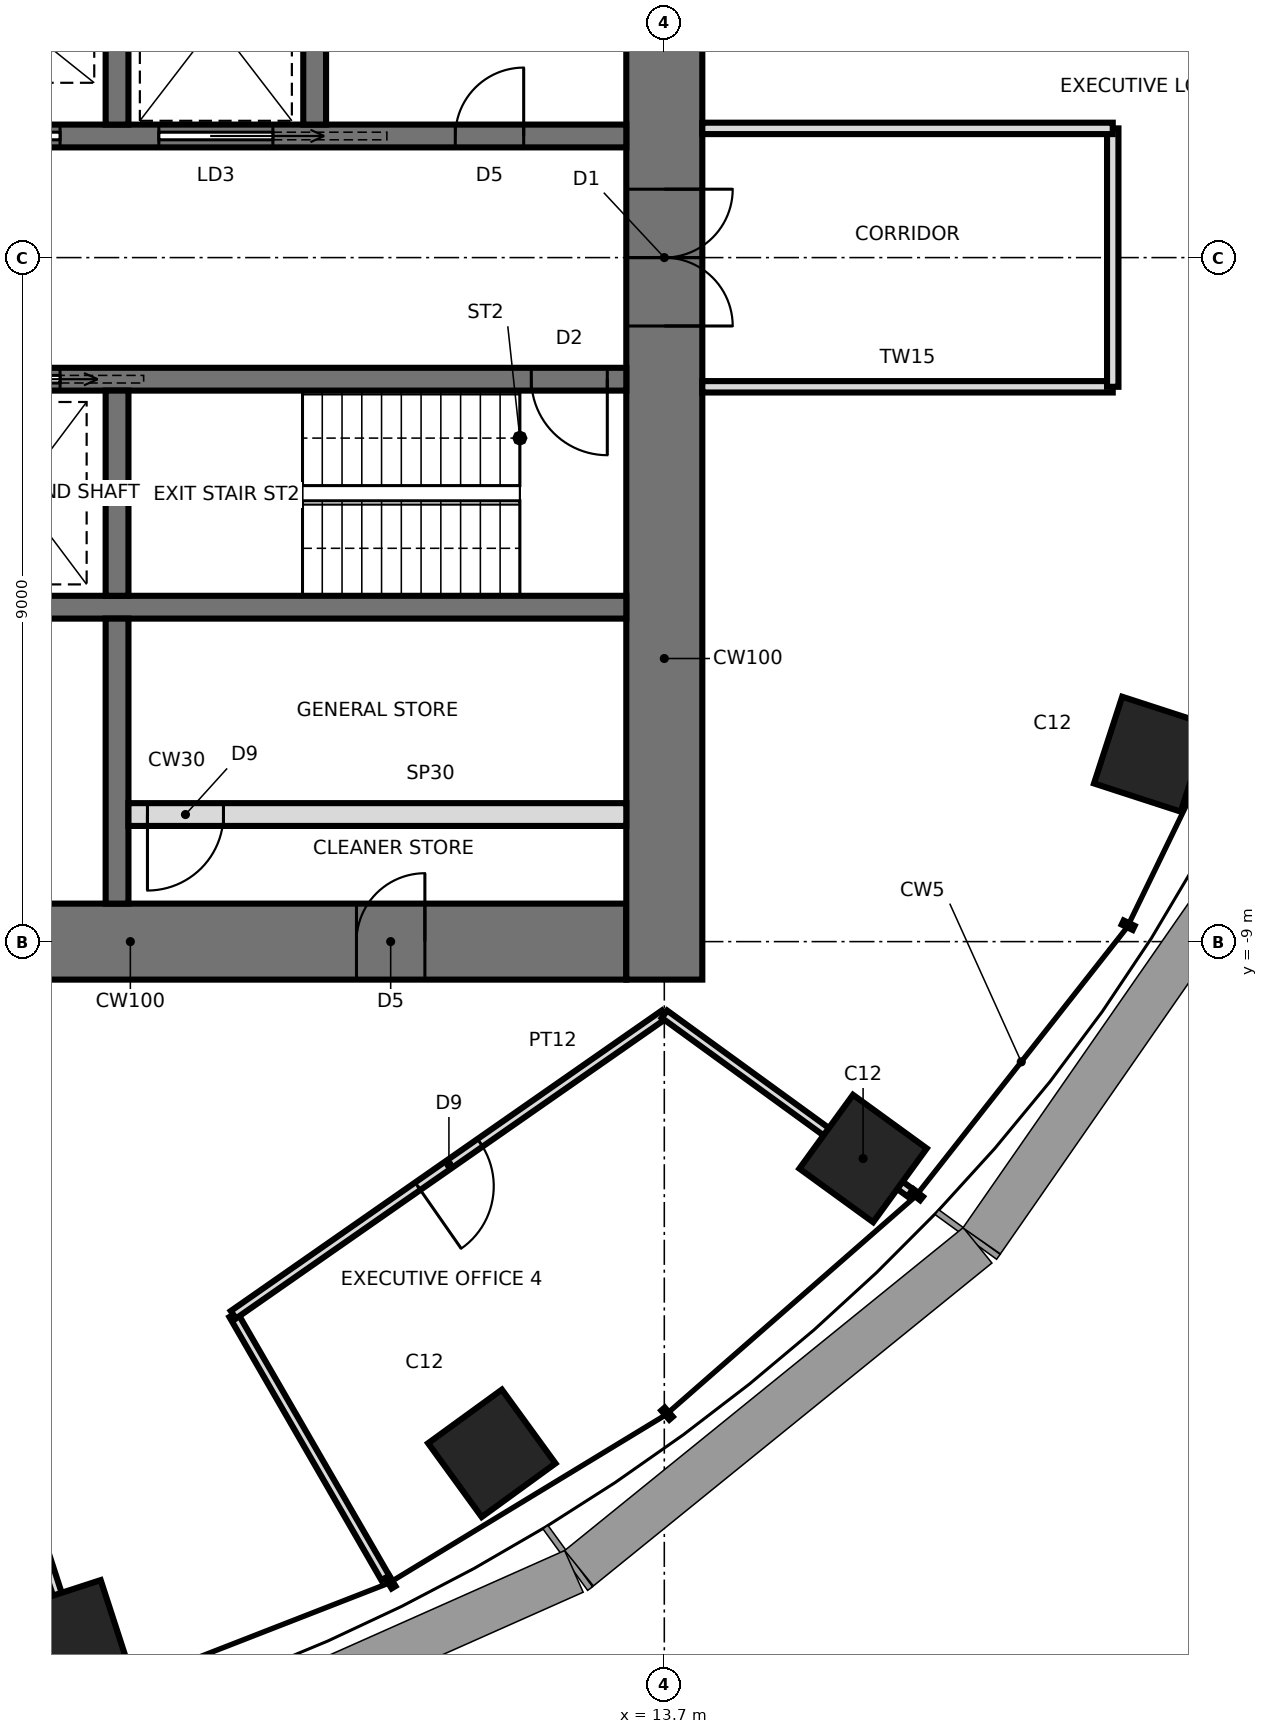
"""IFC4 building model, lengths in metres.
Left out: names, types, materials, properties, quantities, classifications, styles, units other than length and angle.
Written with IfcOpenShell. Run it as: python <this file> out.ifc"""

import sys

from ifc_helpers import new_model, si_unit, direction, frame, frame_2d, origin, origin_2d, place, context, subcontext, project, spatial, rectangle, extrude, element, fill, save


model = new_model("IFC4")
c1 = context("Model", 3, precision=1e-05, world=origin(), true_north=direction((0.0, 1.0)))
c2 = subcontext(c1, "Body", "Model", "MODEL_VIEW")
j1 = project(units=[si_unit("LENGTHUNIT", "METRE"), si_unit("PLANEANGLEUNIT", "RADIAN")], contexts=[c1])
p1 = place(None, origin())
s1 = spatial("IfcSite", under=j1, at=p1, CompositionType="ELEMENT")
p2 = place(p1, origin())
s2 = spatial("IfcBuilding", under=s1, at=p2, CompositionType="ELEMENT")
p3 = place(p2, frame((0.0, 0.0, 256.0)))
s3 = spatial("IfcBuildingStorey", under=s2, at=p3, CompositionType="ELEMENT", Elevation=256.0)
for number, where, z_axis, x_axis in (
    (1, (5.9, -18.157, 0.0), (0.0, 0.0, 1.0), (0.309, -0.951, 0.0)),
    (2, (11.43, -15.733, 0.0), (0.0, 0.0, 1.0), (0.588, -0.809, 0.0)),
    (3, (16.315, -11.854, 0.0), (0.0, 0.0, 1.0), (0.809, -0.588, 0.0)),
    (4, (20.109, -6.534, 0.0), (0.0, 0.0, 1.0), (0.951, -0.309, 0.0)),
):
    element("IfcColumn", number, at=place(p3, frame(where, z_axis=z_axis, x_axis=x_axis)), inside=s3, PredefinedType="COLUMN", context=c2, shape_type="SweptSolid", body=[
        extrude(rectangle(XDim=1.2, YDim=1.2, at=origin_2d()), origin(), (0.0, 0.0, 1.0), 4.2),
    ])
p4 = place(p3, frame((-13.2, -9.0, 0.0), z_axis=(0.0, 0.0, 1.0), x_axis=(1.0, 0.0, 0.0)))
e5 = element("IfcWall", 5, at=p4, inside=s3, PredefinedType="SHEAR", context=c2, shape_type="SweptSolid", body=[
    extrude(rectangle(XDim=26.4, YDim=1.0, at=frame_2d((13.2, 0.0))), origin(), (0.0, 0.0, 1.0), 4.2),
])
p5 = place(p4, frame((2.65, 0.0, 0.0)))
e6 = element("IfcOpeningElement", 6, at=p5, cuts=e5, PredefinedType="OPENING", context=c2, shape_type="SweptSolid", body=[
    extrude(rectangle(XDim=0.9, YDim=2.1, at=frame_2d((0.45, 1.05))), frame((0.0, 0.51, 0.0), z_axis=(0.0, -1.0, 0.0), x_axis=(1.0, 0.0, 0.0)), (0.0, 0.0, 1.0), 1.02),
])
p6 = place(p4, frame((9.5, 0.0, 0.0)))
e7 = element("IfcOpeningElement", 7, at=p6, cuts=e5, PredefinedType="OPENING", context=c2, shape_type="SweptSolid", body=[
    extrude(rectangle(XDim=0.9, YDim=2.1, at=frame_2d((0.45, 1.05))), frame((0.0, 0.51, 0.0), z_axis=(0.0, -1.0, 0.0), x_axis=(1.0, 0.0, 0.0)), (0.0, 0.0, 1.0), 1.02),
])
p7 = place(p4, frame((16.0, 0.0, 0.0)))
e8 = element("IfcOpeningElement", 8, at=p7, cuts=e5, PredefinedType="OPENING", context=c2, shape_type="SweptSolid", body=[
    extrude(rectangle(XDim=0.9, YDim=2.1, at=frame_2d((0.45, 1.05))), frame((0.0, 0.51, 0.0), z_axis=(0.0, -1.0, 0.0), x_axis=(1.0, 0.0, 0.0)), (0.0, 0.0, 1.0), 1.02),
])
p8 = place(p4, frame((22.85, 0.0, 0.0)))
e9 = element("IfcOpeningElement", 9, at=p8, cuts=e5, PredefinedType="OPENING", context=c2, shape_type="SweptSolid", body=[
    extrude(rectangle(XDim=0.9, YDim=2.1, at=frame_2d((0.45, 1.05))), frame((0.0, 0.51, 0.0), z_axis=(0.0, -1.0, 0.0), x_axis=(1.0, 0.0, 0.0)), (0.0, 0.0, 1.0), 1.02),
])
p9 = place(p3, frame((13.7, -9.5, 0.0), z_axis=(0.0, 0.0, 1.0), x_axis=(0.0, 1.0, 0.0)))
e10 = element("IfcWall", 10, at=p9, inside=s3, PredefinedType="SHEAR", context=c2, shape_type="SweptSolid", body=[
    extrude(rectangle(XDim=19.0, YDim=1.0, at=frame_2d((9.5, 0.0))), origin(), (0.0, 0.0, 1.0), 4.2),
])
p10 = place(p9, frame((8.6, 0.0, 0.0)))
e11 = element("IfcOpeningElement", 11, at=p10, cuts=e10, PredefinedType="OPENING", context=c2, shape_type="SweptSolid", body=[
    extrude(rectangle(XDim=1.8, YDim=2.4, at=frame_2d((0.9, 1.2))), frame((0.0, 0.51, 0.0), z_axis=(0.0, -1.0, 0.0), x_axis=(1.0, 0.0, 0.0)), (0.0, 0.0, 1.0), 1.02),
])
p11 = place(p3, frame((-13.2, 1.6, 0.0), z_axis=(0.0, 0.0, 1.0), x_axis=(1.0, 0.0, 0.0)))
e12 = element("IfcWall", 12, at=p11, inside=s3, PredefinedType="SHEAR", context=c2, shape_type="SweptSolid", body=[
    extrude(rectangle(XDim=26.4, YDim=0.3, at=frame_2d((13.2, 0.0))), origin(), (0.0, 0.0, 1.0), 4.2),
])
p12 = place(p11, frame((0.25, 0.0, 0.0)))
e13 = element("IfcOpeningElement", 13, at=p12, cuts=e12, PredefinedType="OPENING", context=c2, shape_type="SweptSolid", body=[
    extrude(rectangle(XDim=1.0, YDim=2.1, at=frame_2d((0.5, 1.05))), frame((0.0, 0.16, 0.0), z_axis=(0.0, -1.0, 0.0), x_axis=(1.0, 0.0, 0.0)), (0.0, 0.0, 1.0), 0.32),
])
p13 = place(p11, frame((20.25, 0.0, 0.0)))
e14 = element("IfcOpeningElement", 14, at=p13, cuts=e12, PredefinedType="OPENING", context=c2, shape_type="SweptSolid", body=[
    extrude(rectangle(XDim=1.5, YDim=2.4, at=frame_2d((0.75, 1.2))), frame((0.0, 0.16, 0.0), z_axis=(0.0, -1.0, 0.0), x_axis=(1.0, 0.0, 0.0)), (0.0, 0.0, 1.0), 0.32),
])
p14 = place(p11, frame((7.55, 0.0, 0.0)))
e15 = element("IfcOpeningElement", 15, at=p14, cuts=e12, PredefinedType="OPENING", context=c2, shape_type="SweptSolid", body=[
    extrude(rectangle(XDim=0.9, YDim=2.1, at=frame_2d((0.45, 1.05))), frame((0.0, 0.16, 0.0), z_axis=(0.0, -1.0, 0.0), x_axis=(1.0, 0.0, 0.0)), (0.0, 0.0, 1.0), 0.32),
])
p15 = place(p11, frame((10.15, 0.0, 0.0)))
e16 = element("IfcOpeningElement", 16, at=p15, cuts=e12, PredefinedType="OPENING", context=c2, shape_type="SweptSolid", body=[
    extrude(rectangle(XDim=0.9, YDim=2.1, at=frame_2d((0.45, 1.05))), frame((0.0, 0.16, 0.0), z_axis=(0.0, -1.0, 0.0), x_axis=(1.0, 0.0, 0.0)), (0.0, 0.0, 1.0), 0.32),
])
p16 = place(p11, frame((12.75, 0.0, 0.0)))
e17 = element("IfcOpeningElement", 17, at=p16, cuts=e12, PredefinedType="OPENING", context=c2, shape_type="SweptSolid", body=[
    extrude(rectangle(XDim=0.9, YDim=2.1, at=frame_2d((0.45, 1.05))), frame((0.0, 0.16, 0.0), z_axis=(0.0, -1.0, 0.0), x_axis=(1.0, 0.0, 0.0)), (0.0, 0.0, 1.0), 0.32),
])
p17 = place(p11, frame((15.25, 0.0, 0.0)))
e18 = element("IfcOpeningElement", 18, at=p17, cuts=e12, PredefinedType="OPENING", context=c2, shape_type="SweptSolid", body=[
    extrude(rectangle(XDim=1.1, YDim=2.3, at=frame_2d((0.55, 1.15))), frame((0.0, 0.16, 0.0), z_axis=(0.0, -1.0, 0.0), x_axis=(1.0, 0.0, 0.0)), (0.0, 0.0, 1.0), 0.32),
])
p18 = place(p11, frame((17.85, 0.0, 0.0)))
e19 = element("IfcOpeningElement", 19, at=p18, cuts=e12, PredefinedType="OPENING", context=c2, shape_type="SweptSolid", body=[
    extrude(rectangle(XDim=1.1, YDim=2.3, at=frame_2d((0.55, 1.15))), frame((0.0, 0.16, 0.0), z_axis=(0.0, -1.0, 0.0), x_axis=(1.0, 0.0, 0.0)), (0.0, 0.0, 1.0), 0.32),
])
p19 = place(p11, frame((24.15, 0.0, 0.0)))
e20 = element("IfcOpeningElement", 20, at=p19, cuts=e12, PredefinedType="OPENING", context=c2, shape_type="SweptSolid", body=[
    extrude(rectangle(XDim=0.9, YDim=2.1, at=frame_2d((0.45, 1.05))), frame((0.0, 0.16, 0.0), z_axis=(0.0, -1.0, 0.0), x_axis=(1.0, 0.0, 0.0)), (0.0, 0.0, 1.0), 0.32),
])
p20 = place(p3, frame((-13.2, -1.6, 0.0), z_axis=(0.0, 0.0, 1.0), x_axis=(1.0, 0.0, 0.0)))
e21 = element("IfcWall", 21, at=p20, inside=s3, PredefinedType="SHEAR", context=c2, shape_type="SweptSolid", body=[
    extrude(rectangle(XDim=26.4, YDim=0.3, at=frame_2d((13.2, 0.0))), origin(), (0.0, 0.0, 1.0), 4.2),
])
p21 = place(p20, frame((25.15, 0.0, 0.0)))
e22 = element("IfcOpeningElement", 22, at=p21, cuts=e21, PredefinedType="OPENING", context=c2, shape_type="SweptSolid", body=[
    extrude(rectangle(XDim=1.0, YDim=2.1, at=frame_2d((0.5, 1.05))), frame((0.0, 0.16, 0.0), z_axis=(0.0, -1.0, 0.0), x_axis=(1.0, 0.0, 0.0)), (0.0, 0.0, 1.0), 0.32),
])
p22 = place(p20, frame((7.55, 0.0, 0.0)))
e23 = element("IfcOpeningElement", 23, at=p22, cuts=e21, PredefinedType="OPENING", context=c2, shape_type="SweptSolid", body=[
    extrude(rectangle(XDim=0.9, YDim=2.1, at=frame_2d((0.45, 1.05))), frame((0.0, 0.16, 0.0), z_axis=(0.0, -1.0, 0.0), x_axis=(1.0, 0.0, 0.0)), (0.0, 0.0, 1.0), 0.32),
])
p23 = place(p20, frame((10.15, 0.0, 0.0)))
e24 = element("IfcOpeningElement", 24, at=p23, cuts=e21, PredefinedType="OPENING", context=c2, shape_type="SweptSolid", body=[
    extrude(rectangle(XDim=0.9, YDim=2.1, at=frame_2d((0.45, 1.05))), frame((0.0, 0.16, 0.0), z_axis=(0.0, -1.0, 0.0), x_axis=(1.0, 0.0, 0.0)), (0.0, 0.0, 1.0), 0.32),
])
p24 = place(p20, frame((12.75, 0.0, 0.0)))
e25 = element("IfcOpeningElement", 25, at=p24, cuts=e21, PredefinedType="OPENING", context=c2, shape_type="SweptSolid", body=[
    extrude(rectangle(XDim=0.9, YDim=2.1, at=frame_2d((0.45, 1.05))), frame((0.0, 0.16, 0.0), z_axis=(0.0, -1.0, 0.0), x_axis=(1.0, 0.0, 0.0)), (0.0, 0.0, 1.0), 0.32),
])
p25 = place(p20, frame((15.25, 0.0, 0.0)))
e26 = element("IfcOpeningElement", 26, at=p25, cuts=e21, PredefinedType="OPENING", context=c2, shape_type="SweptSolid", body=[
    extrude(rectangle(XDim=1.1, YDim=2.3, at=frame_2d((0.55, 1.15))), frame((0.0, 0.16, 0.0), z_axis=(0.0, -1.0, 0.0), x_axis=(1.0, 0.0, 0.0)), (0.0, 0.0, 1.0), 0.32),
])
p26 = place(p20, frame((17.85, 0.0, 0.0)))
e27 = element("IfcOpeningElement", 27, at=p26, cuts=e21, PredefinedType="OPENING", context=c2, shape_type="SweptSolid", body=[
    extrude(rectangle(XDim=1.1, YDim=2.3, at=frame_2d((0.55, 1.15))), frame((0.0, 0.16, 0.0), z_axis=(0.0, -1.0, 0.0), x_axis=(1.0, 0.0, 0.0)), (0.0, 0.0, 1.0), 0.32),
])
p27 = place(p20, frame((5.55, 0.0, 0.0)))
e28 = element("IfcOpeningElement", 28, at=p27, cuts=e21, PredefinedType="OPENING", context=c2, shape_type="SweptSolid", body=[
    extrude(rectangle(XDim=0.9, YDim=2.1, at=frame_2d((0.45, 1.05))), frame((0.0, 0.16, 0.0), z_axis=(0.0, -1.0, 0.0), x_axis=(1.0, 0.0, 0.0)), (0.0, 0.0, 1.0), 0.32),
])
p28 = place(p3, frame((-13.2, -4.6, 0.0), z_axis=(0.0, 0.0, 1.0), x_axis=(1.0, 0.0, 0.0)))
e29 = element("IfcWall", 29, at=p28, inside=s3, PredefinedType="SHEAR", context=c2, shape_type="SweptSolid", body=[
    extrude(rectangle(XDim=26.4, YDim=0.3, at=frame_2d((13.2, 0.0))), origin(), (0.0, 0.0, 1.0), 4.2),
])
for number, where, z_axis, x_axis in (
    (30, (6.5, 1.75, 0.0), (0.0, 0.0, 1.0), (0.0, 1.0, 0.0)),
    (31, (6.5, -1.75, 0.0), (0.0, 0.0, 1.0), (0.0, -1.0, 0.0)),
):
    element("IfcWall", number, at=place(p3, frame(where, z_axis=z_axis, x_axis=x_axis)), inside=s3, PredefinedType="SHEAR", context=c2, shape_type="SweptSolid", body=[
        extrude(rectangle(XDim=2.7, YDim=0.3, at=frame_2d((1.35, 0.0))), origin(), (0.0, 0.0, 1.0), 4.2),
    ])
p29 = place(p3, frame((6.5, -4.75, 0.0), z_axis=(0.0, 0.0, 1.0), x_axis=(0.0, -1.0, 0.0)))
e32 = element("IfcWall", 32, at=p29, inside=s3, PredefinedType="SHEAR", context=c2, shape_type="SweptSolid", body=[
    extrude(rectangle(XDim=3.75, YDim=0.3, at=frame_2d((1.875, 0.0))), origin(), (0.0, 0.0, 1.0), 4.2),
])
p30 = place(p3, frame((9.1, 1.75, 0.0), z_axis=(0.0, 0.0, 1.0), x_axis=(0.0, 1.0, 0.0)))
e33 = element("IfcWall", 33, at=p30, inside=s3, PredefinedType="SHEAR", context=c2, shape_type="SweptSolid", body=[
    extrude(rectangle(XDim=2.7, YDim=0.3, at=frame_2d((1.35, 0.0))), origin(), (0.0, 0.0, 1.0), 4.2),
])
p31 = place(p3, frame((6.65, -7.328, 0.0), z_axis=(0.0, 0.0, 1.0), x_axis=(1.0, 0.0, 0.0)))
e34 = element("IfcWall", 34, at=p31, inside=s3, PredefinedType="PARTITIONING", context=c2, shape_type="SweptSolid", body=[
    extrude(rectangle(XDim=6.55, YDim=0.3, at=frame_2d((3.275, 0.0))), origin(), (0.0, 0.0, 1.0), 4.04),
])
p32 = place(p31, frame((0.25, 0.0, 0.0)))
e35 = element("IfcOpeningElement", 35, at=p32, cuts=e34, PredefinedType="OPENING", context=c2, shape_type="SweptSolid", body=[
    extrude(rectangle(XDim=1.0, YDim=2.4, at=frame_2d((0.5, 1.2))), frame((0.0, 0.16, 0.0), z_axis=(0.0, -1.0, 0.0), x_axis=(1.0, 0.0, 0.0)), (0.0, 0.0, 1.0), 0.32),
])
p33 = place(p3, frame((6.137, -18.889, 0.0), z_axis=(0.0, 0.0, 1.0), x_axis=(-0.309007859613, 0.951059484311, 0.0)))
e36 = element("IfcWall", 36, at=p33, inside=s3, PredefinedType="PARTITIONING", context=c2, shape_type="SweptSolid", body=[
    extrude(rectangle(XDim=6.917, YDim=0.12, at=frame_2d((3.458, 0.0))), origin(), (0.0, 0.0, 1.0), 3.24),
])
p34 = place(p3, frame((8.031, -13.909, 0.0), z_axis=(0.0, 0.0, 1.0), x_axis=(0.49999894854, -0.866026010844, 0.0)))
e37 = element("IfcWall", 37, at=p34, inside=s3, PredefinedType="PARTITIONING", context=c2, shape_type="SweptSolid", body=[
    extrude(rectangle(XDim=4.0, YDim=0.12, at=frame_2d((2.0, 0.0))), origin(), (0.0, 0.0, 1.0), 4.04),
])
p35 = place(p3, frame((13.702, -9.955, 0.0), z_axis=(0.0, 0.0, 1.0), x_axis=(-0.820320356129, -0.571904286852, 0.0)))
e38 = element("IfcWall", 38, at=p35, inside=s3, PredefinedType="PARTITIONING", context=c2, shape_type="SweptSolid", body=[
    extrude(rectangle(XDim=6.914, YDim=0.12, at=frame_2d((3.457, 0.0))), origin(), (0.0, 0.0, 1.0), 4.04),
])
p36 = place(p35, frame((2.957, 0.0, 0.0)))
e39 = element("IfcOpeningElement", 39, at=p36, cuts=e38, PredefinedType="OPENING", context=c2, shape_type="SweptSolid", body=[
    extrude(rectangle(XDim=1.0, YDim=2.4, at=frame_2d((0.5, 1.2))), frame((0.0, 0.07, 0.0), z_axis=(0.0, -1.0, 0.0), x_axis=(1.0, 0.0, 0.0)), (0.0, 0.0, 1.0), 0.14),
])
p37 = place(p3, frame((16.938, -12.306, 0.0), z_axis=(0.0, 0.0, 1.0), x_axis=(-0.809026317077, 0.587772420479, 0.0)))
e40 = element("IfcWall", 40, at=p37, inside=s3, PredefinedType="PARTITIONING", context=c2, shape_type="SweptSolid", body=[
    extrude(rectangle(XDim=4.0, YDim=0.12, at=frame_2d((2.0, 0.0))), origin(), (0.0, 0.0, 1.0), 3.24),
])
p38 = place(p3, frame((14.2, -1.7, 0.0), z_axis=(0.0, 0.0, 1.0), x_axis=(1.0, 0.0, 0.0)))
e41 = element("IfcWall", 41, at=p38, inside=s3, PredefinedType="PARTITIONING", context=c2, shape_type="SweptSolid", body=[
    extrude(rectangle(XDim=5.4, YDim=0.15, at=frame_2d((2.7, 0.0))), origin(), (0.0, 0.0, 1.0), 4.04),
])
p39 = place(p3, frame((19.6, -1.7, 0.0), z_axis=(0.0, 0.0, 1.0), x_axis=(0.0, 1.0, 0.0)))
e42 = element("IfcWall", 42, at=p39, inside=s3, PredefinedType="PARTITIONING", context=c2, shape_type="SweptSolid", body=[
    extrude(rectangle(XDim=3.4, YDim=0.15, at=frame_2d((1.7, 0.0))), origin(), (0.0, 0.0, 1.0), 4.04),
])
p40 = place(p3, frame((19.6, 1.7, 0.0), z_axis=(0.0, 0.0, 1.0), x_axis=(-1.0, 0.0, 0.0)))
e43 = element("IfcWall", 43, at=p40, inside=s3, PredefinedType="PARTITIONING", context=c2, shape_type="SweptSolid", body=[
    extrude(rectangle(XDim=5.4, YDim=0.15, at=frame_2d((2.7, 0.0))), origin(), (0.0, 0.0, 1.0), 4.04),
])
p41 = place(p10, frame((1.8, 0.0, 0.0), z_axis=(0.0, 0.0, 1.0), x_axis=(-1.0, 0.0, 0.0)))
e44 = element("IfcDoor", 44, at=p41, inside=s3, OperationType="DOUBLE_DOOR_SINGLE_SWING", PredefinedType="DOOR", context=c2, shape_type="SweptSolid", body=[
    extrude(rectangle(XDim=1.72, YDim=2.36, at=frame_2d((0.9, 1.18))), frame((0.0, 0.025, 0.0), z_axis=(0.0, -1.0, 0.0), x_axis=(1.0, 0.0, 0.0)), (0.0, 0.0, 1.0), 0.05),
    extrude(rectangle(XDim=0.04, YDim=2.4, at=frame_2d((1.78, 1.2))), frame((0.0, 0.25, 0.0), z_axis=(0.0, -1.0, 0.0), x_axis=(1.0, 0.0, 0.0)), (0.0, 0.0, 1.0), 0.5),
    extrude(rectangle(XDim=0.04, YDim=2.4, at=frame_2d((0.02, 1.2))), frame((0.0, 0.25, 0.0), z_axis=(0.0, -1.0, 0.0), x_axis=(1.0, 0.0, 0.0)), (0.0, 0.0, 1.0), 0.5),
    extrude(rectangle(XDim=1.72, YDim=0.04, at=frame_2d((0.9, 2.38))), frame((0.0, 0.25, 0.0), z_axis=(0.0, -1.0, 0.0), x_axis=(1.0, 0.0, 0.0)), (0.0, 0.0, 1.0), 0.5),
])
fill(e11, e44)
p42 = place(p21, frame((1.0, 0.0, 0.0), z_axis=(0.0, 0.0, 1.0), x_axis=(-1.0, 0.0, 0.0)))
e45 = element("IfcDoor", 45, at=p42, inside=s3, OperationType="SINGLE_SWING_LEFT", PredefinedType="DOOR", context=c2, shape_type="SweptSolid", body=[
    extrude(rectangle(XDim=1.0, YDim=2.1, at=frame_2d((0.5, 1.05))), frame((0.0, 0.025, 0.0), z_axis=(0.0, -1.0, 0.0), x_axis=(1.0, 0.0, 0.0)), (0.0, 0.0, 1.0), 0.05),
])
fill(e22, e45)
p43 = place(p13, origin())
e46 = element("IfcDoor", 46, at=p43, inside=s3, OperationType="SLIDING_TO_RIGHT", PredefinedType="DOOR", context=c2, shape_type="SweptSolid", body=[
    extrude(rectangle(XDim=1.5, YDim=2.4, at=frame_2d((0.75, 1.2))), frame((0.0, 0.025, 0.0), z_axis=(0.0, -1.0, 0.0), x_axis=(1.0, 0.0, 0.0)), (0.0, 0.0, 1.0), 0.05),
])
fill(e14, e46)
p44 = place(p18, origin())
e47 = element("IfcDoor", 47, at=p44, inside=s3, OperationType="SLIDING_TO_LEFT", PredefinedType="DOOR", context=c2, shape_type="SweptSolid", body=[
    extrude(rectangle(XDim=1.1, YDim=2.3, at=frame_2d((0.55, 1.15))), frame((0.0, 0.025, 0.0), z_axis=(0.0, -1.0, 0.0), x_axis=(1.0, 0.0, 0.0)), (0.0, 0.0, 1.0), 0.05),
])
fill(e19, e47)
p45 = place(p26, frame((1.1, 0.0, 0.0), z_axis=(0.0, 0.0, 1.0), x_axis=(-1.0, 0.0, 0.0)))
e48 = element("IfcDoor", 48, at=p45, inside=s3, OperationType="SLIDING_TO_LEFT", PredefinedType="DOOR", context=c2, shape_type="SweptSolid", body=[
    extrude(rectangle(XDim=1.1, YDim=2.3, at=frame_2d((0.55, 1.15))), frame((0.0, 0.025, 0.0), z_axis=(0.0, -1.0, 0.0), x_axis=(1.0, 0.0, 0.0)), (0.0, 0.0, 1.0), 0.05),
])
fill(e27, e48)
p46 = place(p19, origin())
e49 = element("IfcDoor", 49, at=p46, inside=s3, OperationType="SINGLE_SWING_RIGHT", PredefinedType="DOOR", context=c2, shape_type="SweptSolid", body=[
    extrude(rectangle(XDim=0.9, YDim=2.1, at=frame_2d((0.45, 1.05))), frame((0.0, 0.025, 0.0), z_axis=(0.0, -1.0, 0.0), x_axis=(1.0, 0.0, 0.0)), (0.0, 0.0, 1.0), 0.05),
])
fill(e20, e49)
p47 = place(p8, origin())
e50 = element("IfcDoor", 50, at=p47, inside=s3, OperationType="SINGLE_SWING_RIGHT", PredefinedType="DOOR", context=c2, shape_type="SweptSolid", body=[
    extrude(rectangle(XDim=0.82, YDim=2.06, at=frame_2d((0.45, 1.03))), frame((0.0, 0.025, 0.0), z_axis=(0.0, -1.0, 0.0), x_axis=(1.0, 0.0, 0.0)), (0.0, 0.0, 1.0), 0.05),
    extrude(rectangle(XDim=0.04, YDim=2.1, at=frame_2d((0.02, 1.05))), frame((0.0, 0.25, 0.0), z_axis=(0.0, -1.0, 0.0), x_axis=(1.0, 0.0, 0.0)), (0.0, 0.0, 1.0), 0.5),
    extrude(rectangle(XDim=0.04, YDim=2.1, at=frame_2d((0.88, 1.05))), frame((0.0, 0.25, 0.0), z_axis=(0.0, -1.0, 0.0), x_axis=(1.0, 0.0, 0.0)), (0.0, 0.0, 1.0), 0.5),
    extrude(rectangle(XDim=0.82, YDim=0.04, at=frame_2d((0.45, 2.08))), frame((0.0, 0.25, 0.0), z_axis=(0.0, -1.0, 0.0), x_axis=(1.0, 0.0, 0.0)), (0.0, 0.0, 1.0), 0.5),
])
fill(e9, e50)
p48 = place(p32, frame((1.0, 0.0, 0.0), z_axis=(0.0, 0.0, 1.0), x_axis=(-1.0, 0.0, 0.0)))
e51 = element("IfcDoor", 51, at=p48, inside=s3, OperationType="SINGLE_SWING_RIGHT", PredefinedType="DOOR", context=c2, shape_type="SweptSolid", body=[
    extrude(rectangle(XDim=1.0, YDim=2.4, at=frame_2d((0.5, 1.2))), frame((0.0, 0.025, 0.0), z_axis=(0.0, -1.0, 0.0), x_axis=(1.0, 0.0, 0.0)), (0.0, 0.0, 1.0), 0.05),
])
fill(e35, e51)
p49 = place(p36, origin())
e52 = element("IfcDoor", 52, at=p49, inside=s3, OperationType="SINGLE_SWING_RIGHT", PredefinedType="DOOR", context=c2, shape_type="SweptSolid", body=[
    extrude(rectangle(XDim=1.0, YDim=2.4, at=frame_2d((0.5, 1.2))), frame((0.0, 0.025, 0.0), z_axis=(0.0, -1.0, 0.0), x_axis=(1.0, 0.0, 0.0)), (0.0, 0.0, 1.0), 0.05),
])
fill(e39, e52)
save(model, sys.argv[1])
